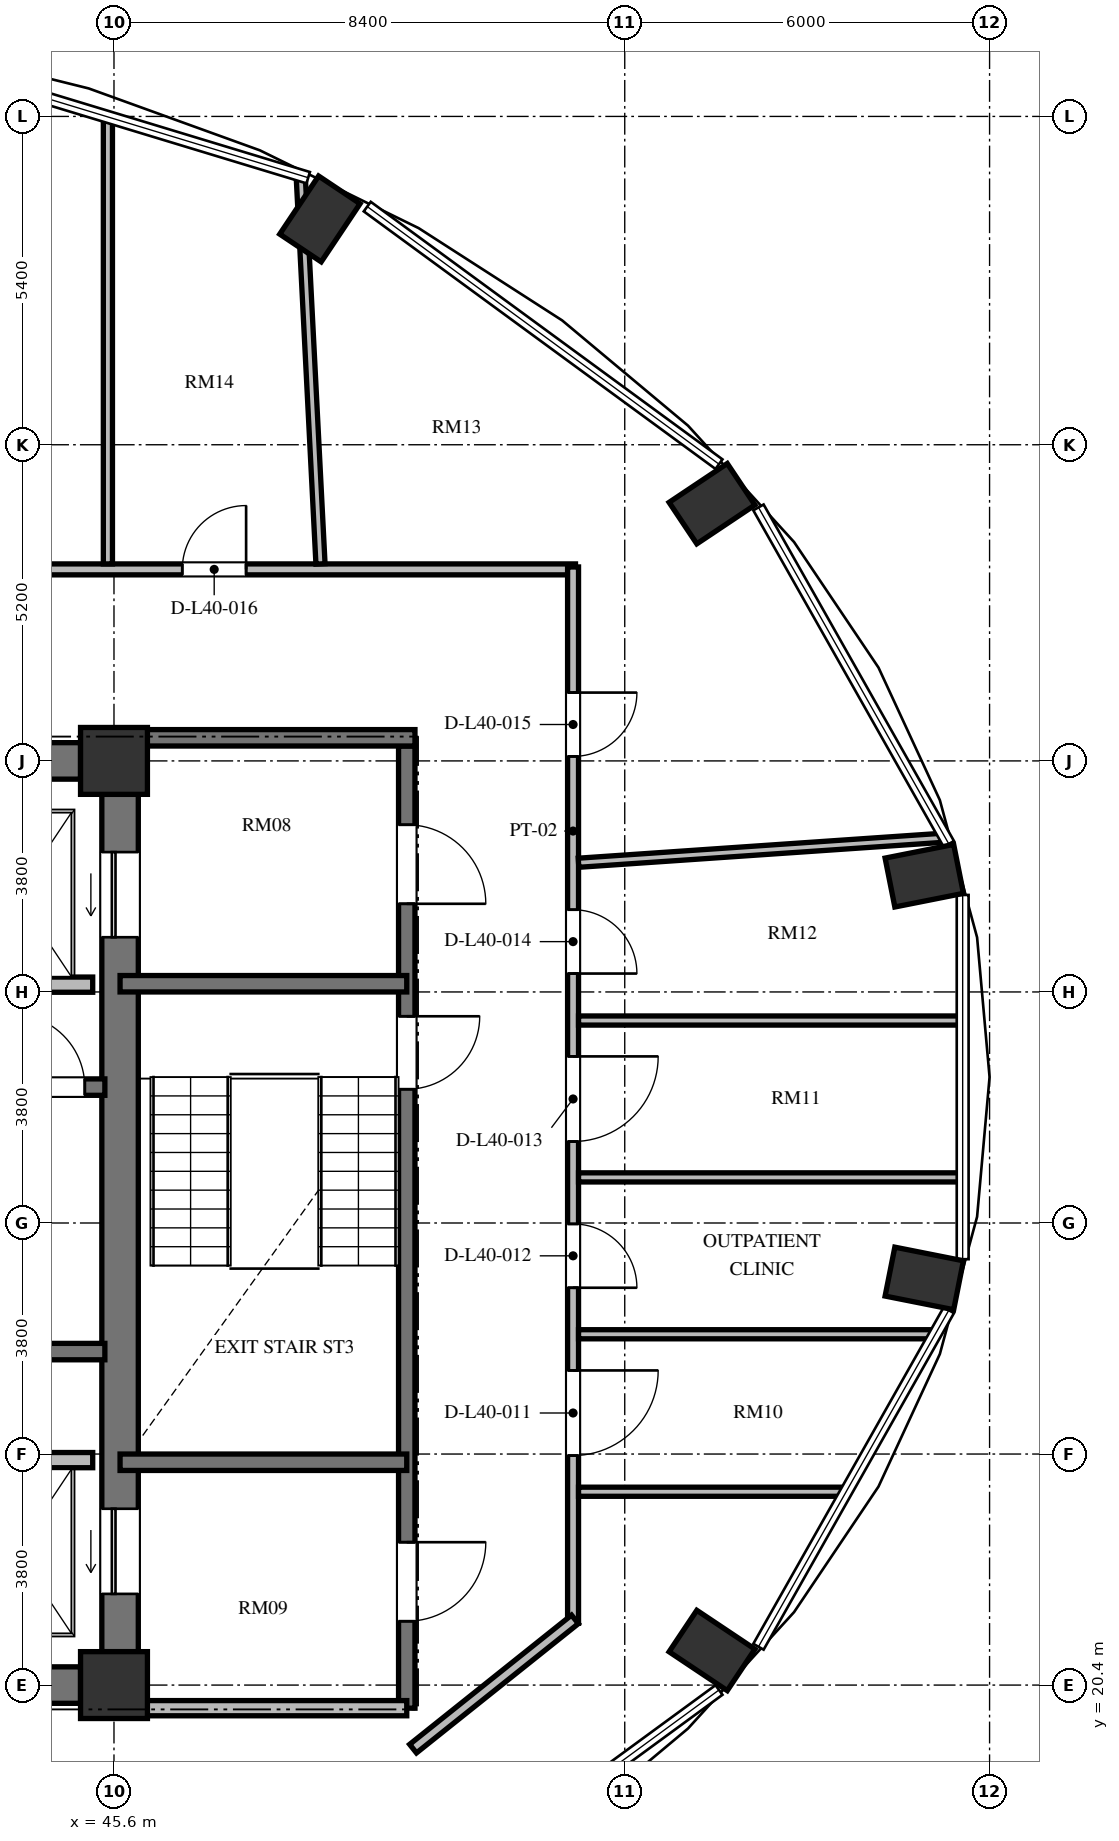
"""IFC4 building model, lengths in metres.
Left out: names, types, materials, properties, quantities, classifications, styles, units other than length and angle.
Written with IfcOpenShell. Run it as: python <this file> out.ifc"""

import sys

from ifc_helpers import new_model, si_unit, direction, frame, frame_2d, origin, origin_2d, place, context, subcontext, project, spatial, rectangle, extrude, element, fill, save


model = new_model("IFC4")
c1 = context("Model", 3, precision=1e-05, world=origin(), true_north=direction((0.0, 1.0)))
c2 = subcontext(c1, "Body", "Model", "MODEL_VIEW")
j1 = project(units=[si_unit("LENGTHUNIT", "METRE"), si_unit("PLANEANGLEUNIT", "RADIAN")], contexts=[c1])
p1 = place(None, origin())
s1 = spatial("IfcSite", under=j1, at=p1, CompositionType="ELEMENT")
p2 = place(p1, origin())
s2 = spatial("IfcBuilding", under=s1, at=p2, CompositionType="ELEMENT")
p3 = place(p2, frame((0.0, 0.0, 156.528)))
s3 = spatial("IfcBuildingStorey", under=s2, at=p3, CompositionType="ELEMENT", Elevation=156.528)
for number, where, z_axis, x_axis in (
    (1, (55.436, 20.969, 0.0), (0.0, 0.0, 1.0), (0.831, -0.556, 0.0)),
    (2, (58.926, 27.088, 0.0), (0.0, 0.0, 1.0), (0.981, -0.195, 0.0)),
    (3, (58.926, 33.712, 0.0), (0.0, 0.0, 1.0), (0.981, 0.195, 0.0)),
    (4, (55.436, 39.831, 0.0), (0.0, 0.0, 1.0), (0.831, 0.556, 0.0)),
    (5, (48.987, 44.514, 0.0), (0.0, 0.0, 1.0), (0.556, 0.831, 0.0)),
):
    element("IfcColumn", number, at=place(p3, frame(where, z_axis=z_axis, x_axis=x_axis)), inside=s3, PredefinedType="COLUMN", context=c2, shape_type="SweptSolid", body=[
        extrude(rectangle(XDim=1.15, YDim=0.82, at=origin_2d()), origin(), (0.0, 0.0, 1.0), 3.648),
    ])
for number, where, z_axis, x_axis in (
    (6, (45.6, 20.4, 0.0), (0.0, 0.0, 1.0), (1.0, 0.0, 0.0)),
    (7, (45.6, 35.6, 0.0), (0.0, 0.0, 1.0), (1.0, 0.0, 0.0)),
):
    element("IfcColumn", number, at=place(p3, frame(where, z_axis=z_axis, x_axis=x_axis)), inside=s3, PredefinedType="COLUMN", context=c2, shape_type="SweptSolid", body=[
        extrude(rectangle(XDim=1.1, YDim=1.1, at=origin_2d()), origin(), (0.0, 0.0, 1.0), 3.648),
    ])
p4 = place(p3, frame((45.7, 20.95, 0.0), z_axis=(0.0, 0.0, 1.0), x_axis=(0.0, 1.0, 0.0)))
e8 = element("IfcWall", 8, at=p4, inside=s3, PredefinedType="SHEAR", context=c2, shape_type="SweptSolid", body=[
    extrude(rectangle(XDim=14.1, YDim=0.6, at=frame_2d((7.05, 0.0))), origin(), (0.0, 0.0, 1.0), 3.648),
])
p5 = place(p4, frame((11.75, 0.0, 0.0)))
e9 = element("IfcOpeningElement", 9, at=p5, cuts=e8, PredefinedType="OPENING", context=c2, shape_type="SweptSolid", body=[
    extrude(rectangle(XDim=1.4, YDim=2.3, at=frame_2d((0.7, 1.15))), frame((0.0, 0.31, 0.0), z_axis=(0.0, -1.0, 0.0), x_axis=(1.0, 0.0, 0.0)), (0.0, 0.0, 1.0), 0.62),
])
p6 = place(p4, frame((0.95, 0.0, 0.0)))
e10 = element("IfcOpeningElement", 10, at=p6, cuts=e8, PredefinedType="OPENING", context=c2, shape_type="SweptSolid", body=[
    extrude(rectangle(XDim=1.4, YDim=2.3, at=frame_2d((0.7, 1.15))), frame((0.0, 0.31, 0.0), z_axis=(0.0, -1.0, 0.0), x_axis=(1.0, 0.0, 0.0)), (0.0, 0.0, 1.0), 0.62),
])
for number, where, z_axis, x_axis in (
    (11, (39.675, 20.4, 0.0), (0.0, 0.0, 1.0), (1.0, 0.0, 0.0)),
    (12, (39.675, 35.6, 0.0), (0.0, 0.0, 1.0), (1.0, 0.0, 0.0)),
):
    element("IfcWall", number, at=place(p3, frame(where, z_axis=z_axis, x_axis=x_axis)), inside=s3, PredefinedType="SHEAR", context=c2, shape_type="SweptSolid", body=[
        extrude(rectangle(XDim=5.375, YDim=0.6, at=frame_2d((2.688, 0.0))), origin(), (0.0, 0.0, 1.0), 3.648),
    ])
p7 = place(p3, frame((37.465, 30.235, 0.0), z_axis=(0.0, 0.0, 1.0), x_axis=(1.0, 0.0, 0.0)))
e13 = element("IfcWall", 13, at=p7, inside=s3, PredefinedType="SHEAR", context=c2, shape_type="SweptSolid", body=[
    extrude(rectangle(XDim=7.985, YDim=0.27, at=frame_2d((3.992, 0.0))), origin(), (0.0, 0.0, 1.0), 3.648),
])
p8 = place(p7, frame((6.455, 0.0, 0.0)))
e14 = element("IfcOpeningElement", 14, at=p8, cuts=e13, PredefinedType="OPENING", context=c2, shape_type="SweptSolid", body=[
    extrude(rectangle(XDim=1.2, YDim=2.15, at=frame_2d((0.6, 1.075))), frame((0.0, 0.145, 0.0), z_axis=(0.0, -1.0, 0.0), x_axis=(1.0, 0.0, 0.0)), (0.0, 0.0, 1.0), 0.29),
])
p9 = place(p3, frame((37.465, 25.885, 0.0), z_axis=(0.0, 0.0, 1.0), x_axis=(1.0, 0.0, 0.0)))
e15 = element("IfcWall", 15, at=p9, inside=s3, PredefinedType="SHEAR", context=c2, shape_type="SweptSolid", body=[
    extrude(rectangle(XDim=7.985, YDim=0.27, at=frame_2d((3.992, 0.0))), origin(), (0.0, 0.0, 1.0), 3.648),
])
for number, where, z_axis, x_axis in (
    (16, (42.95, 31.92, 0.0), (0.0, 0.0, 1.0), (1.0, 0.0, 0.0)),
    (17, (42.95, 24.1, 0.0), (0.0, 0.0, 1.0), (1.0, 0.0, 0.0)),
):
    element("IfcWall", number, at=place(p3, frame(where, z_axis=z_axis, x_axis=x_axis)), inside=s3, PredefinedType="SOLIDWALL", context=c2, shape_type="SweptSolid", body=[
        extrude(rectangle(XDim=2.3, YDim=0.25, at=frame_2d((1.15, 0.0))), origin(), (0.0, 0.0, 1.0), 3.428),
    ])
p10 = place(p3, frame((50.415, 35.845, 0.0), z_axis=(0.0, 0.0, 1.0), x_axis=(0.0, -1.0, 0.0)))
e18 = element("IfcWall", 18, at=p10, inside=s3, PredefinedType="SHEAR", context=c2, shape_type="SweptSolid", body=[
    extrude(rectangle(XDim=15.825, YDim=0.27, at=frame_2d((7.913, 0.0))), origin(), (0.0, 0.0, 1.0), 3.648),
])
p11 = place(p10, frame((4.445, 0.0, 0.0)))
e19 = element("IfcOpeningElement", 19, at=p11, cuts=e18, PredefinedType="OPENING", context=c2, shape_type="SweptSolid", body=[
    extrude(rectangle(XDim=1.2, YDim=2.15, at=frame_2d((0.6, 1.075))), frame((0.0, 0.145, 0.0), z_axis=(0.0, -1.0, 0.0), x_axis=(1.0, 0.0, 0.0)), (0.0, 0.0, 1.0), 0.29),
])
p12 = place(p10, frame((1.295, 0.0, 0.0)))
e20 = element("IfcOpeningElement", 20, at=p12, cuts=e18, PredefinedType="OPENING", context=c2, shape_type="SweptSolid", body=[
    extrude(rectangle(XDim=1.3, YDim=2.2, at=frame_2d((0.65, 1.1))), frame((0.0, 0.145, 0.0), z_axis=(0.0, -1.0, 0.0), x_axis=(1.0, 0.0, 0.0)), (0.0, 0.0, 1.0), 0.29),
])
p13 = place(p10, frame((13.095, 0.0, 0.0)))
e21 = element("IfcOpeningElement", 21, at=p13, cuts=e18, PredefinedType="OPENING", context=c2, shape_type="SweptSolid", body=[
    extrude(rectangle(XDim=1.3, YDim=2.2, at=frame_2d((0.65, 1.1))), frame((0.0, 0.145, 0.0), z_axis=(0.0, -1.0, 0.0), x_axis=(1.0, 0.0, 0.0)), (0.0, 0.0, 1.0), 0.29),
])
p14 = place(p3, frame((46.0, 35.98, 0.0), z_axis=(0.0, 0.0, 1.0), x_axis=(1.0, 0.0, 0.0)))
e22 = element("IfcWall", 22, at=p14, inside=s3, PredefinedType="SHEAR", context=c2, shape_type="SweptSolid", body=[
    extrude(rectangle(XDim=4.55, YDim=0.27, at=frame_2d((2.275, 0.0))), origin(), (0.0, 0.0, 1.0), 3.648),
])
for number, where, z_axis, x_axis in (
    (23, (45.7, 31.935, 0.0), (0.0, 0.0, 1.0), (1.0, 0.0, 0.0)),
    (24, (45.7, 24.065, 0.0), (0.0, 0.0, 1.0), (1.0, 0.0, 0.0)),
):
    element("IfcWall", number, at=place(p3, frame(where, z_axis=z_axis, x_axis=x_axis)), inside=s3, PredefinedType="SHEAR", context=c2, shape_type="SweptSolid", body=[
        extrude(rectangle(XDim=4.715, YDim=0.27, at=frame_2d((2.357, 0.0))), origin(), (0.0, 0.0, 1.0), 3.648),
    ])
p15 = place(p3, frame((45.7, 20.02, 0.0), z_axis=(0.0, 0.0, 1.0), x_axis=(1.0, 0.0, 0.0)))
e25 = element("IfcWall", 25, at=p15, inside=s3, PredefinedType="SOLIDWALL", context=c2, shape_type="SweptSolid", body=[
    extrude(rectangle(XDim=4.715, YDim=0.25, at=frame_2d((2.357, 0.0))), origin(), (0.0, 0.0, 1.0), 3.428),
])
p16 = place(p3, frame((39.46, 38.75, 0.0), z_axis=(0.0, 0.0, 1.0), x_axis=(1.0, 0.0, 0.0)))
e26 = element("IfcWall", 26, at=p16, inside=s3, PredefinedType="PARTITIONING", context=c2, shape_type="SweptSolid", body=[
    extrude(rectangle(XDim=13.73, YDim=0.18, at=frame_2d((6.865, 0.0))), origin(), (0.0, 0.0, 1.0), 3.428),
])
p17 = place(p16, frame((7.263, 0.0, 0.0)))
e27 = element("IfcOpeningElement", 27, at=p17, cuts=e26, PredefinedType="OPENING", context=c2, shape_type="SweptSolid", body=[
    extrude(rectangle(XDim=1.05, YDim=2.15, at=frame_2d((0.525, 1.075))), frame((0.0, 0.1, 0.0), z_axis=(0.0, -1.0, 0.0), x_axis=(1.0, 0.0, 0.0)), (0.0, 0.0, 1.0), 0.2),
])
p18 = place(p16, frame((3.765, 0.0, 0.0)))
e28 = element("IfcOpeningElement", 28, at=p18, cuts=e26, PredefinedType="OPENING", context=c2, shape_type="SweptSolid", body=[
    extrude(rectangle(XDim=1.05, YDim=2.15, at=frame_2d((0.525, 1.075))), frame((0.0, 0.1, 0.0), z_axis=(0.0, -1.0, 0.0), x_axis=(1.0, 0.0, 0.0)), (0.0, 0.0, 1.0), 0.2),
])
p19 = place(p3, frame((53.15, 38.79, 0.0), z_axis=(0.0, 0.0, 1.0), x_axis=(0.0, -1.0, 0.0)))
e29 = element("IfcWall", 29, at=p19, inside=s3, PredefinedType="PARTITIONING", context=c2, shape_type="SweptSolid", body=[
    extrude(rectangle(XDim=17.374, YDim=0.18, at=frame_2d((8.687, 0.0))), origin(), (0.0, 0.0, 1.0), 3.428),
])
p20 = place(p19, frame((13.215, 0.0, 0.0)))
e30 = element("IfcOpeningElement", 30, at=p20, cuts=e29, PredefinedType="OPENING", context=c2, shape_type="SweptSolid", body=[
    extrude(rectangle(XDim=1.4, YDim=2.2, at=frame_2d((0.7, 1.1))), frame((0.0, 0.1, 0.0), z_axis=(0.0, -1.0, 0.0), x_axis=(1.0, 0.0, 0.0)), (0.0, 0.0, 1.0), 0.2),
])
p21 = place(p19, frame((10.805, 0.0, 0.0)))
e31 = element("IfcOpeningElement", 31, at=p21, cuts=e29, PredefinedType="OPENING", context=c2, shape_type="SweptSolid", body=[
    extrude(rectangle(XDim=1.05, YDim=2.15, at=frame_2d((0.525, 1.075))), frame((0.0, 0.1, 0.0), z_axis=(0.0, -1.0, 0.0), x_axis=(1.0, 0.0, 0.0)), (0.0, 0.0, 1.0), 0.2),
])
p22 = place(p19, frame((8.05, 0.0, 0.0)))
e32 = element("IfcOpeningElement", 32, at=p22, cuts=e29, PredefinedType="OPENING", context=c2, shape_type="SweptSolid", body=[
    extrude(rectangle(XDim=1.4, YDim=2.2, at=frame_2d((0.7, 1.1))), frame((0.0, 0.1, 0.0), z_axis=(0.0, -1.0, 0.0), x_axis=(1.0, 0.0, 0.0)), (0.0, 0.0, 1.0), 0.2),
])
p23 = place(p19, frame((5.637, 0.0, 0.0)))
e33 = element("IfcOpeningElement", 33, at=p23, cuts=e29, PredefinedType="OPENING", context=c2, shape_type="SweptSolid", body=[
    extrude(rectangle(XDim=1.05, YDim=2.15, at=frame_2d((0.525, 1.075))), frame((0.0, 0.1, 0.0), z_axis=(0.0, -1.0, 0.0), x_axis=(1.0, 0.0, 0.0)), (0.0, 0.0, 1.0), 0.2),
])
p24 = place(p19, frame((2.066, 0.0, 0.0)))
e34 = element("IfcOpeningElement", 34, at=p24, cuts=e29, PredefinedType="OPENING", context=c2, shape_type="SweptSolid", body=[
    extrude(rectangle(XDim=1.05, YDim=2.15, at=frame_2d((0.525, 1.075))), frame((0.0, 0.1, 0.0), z_axis=(0.0, -1.0, 0.0), x_axis=(1.0, 0.0, 0.0)), (0.0, 0.0, 1.0), 0.2),
])
p25 = place(p3, frame((53.181, 21.481, 0.0), z_axis=(0.0, 0.0, 1.0), x_axis=(-0.781420737726, -0.624004511724, 0.0)))
e35 = element("IfcWall", 35, at=p25, inside=s3, PredefinedType="PARTITIONING", context=c2, shape_type="SweptSolid", body=[
    extrude(rectangle(XDim=3.407, YDim=0.18, at=frame_2d((1.704, 0.0))), origin(), (0.0, 0.0, 1.0), 3.428),
])
p26 = place(p3, frame((53.24, 23.58, 0.0), z_axis=(0.0, 0.0, 1.0), x_axis=(1.0, 0.0, 0.0)))
e36 = element("IfcWall", 36, at=p26, inside=s3, PredefinedType="PARTITIONING", context=c2, shape_type="SweptSolid", body=[
    extrude(rectangle(XDim=4.393, YDim=0.15, at=frame_2d((2.196, 0.0))), origin(), (0.0, 0.0, 1.0), 3.428),
])
p27 = place(p3, frame((53.24, 26.17, 0.0), z_axis=(0.0, 0.0, 1.0), x_axis=(1.0, 0.0, 0.0)))
e37 = element("IfcWall", 37, at=p27, inside=s3, PredefinedType="PARTITIONING", context=c2, shape_type="SweptSolid", body=[
    extrude(rectangle(XDim=5.857, YDim=0.15, at=frame_2d((2.929, 0.0))), origin(), (0.0, 0.0, 1.0), 3.428),
])
for number, where, z_axis, x_axis in (
    (38, (53.24, 28.75, 0.0), (0.0, 0.0, 1.0), (1.0, 0.0, 0.0)),
    (39, (53.24, 31.33, 0.0), (0.0, 0.0, 1.0), (1.0, 0.0, 0.0)),
):
    element("IfcWall", number, at=place(p3, frame(where, z_axis=z_axis, x_axis=x_axis)), inside=s3, PredefinedType="PARTITIONING", context=c2, shape_type="SweptSolid", body=[
        extrude(rectangle(XDim=6.307, YDim=0.15, at=frame_2d((3.154, 0.0))), origin(), (0.0, 0.0, 1.0), 3.428),
    ])
p28 = place(p3, frame((53.24, 33.925, 0.0), z_axis=(0.0, 0.0, 1.0), x_axis=(0.997659173086, 0.068382558873, 0.0)))
e40 = element("IfcWall", 40, at=p28, inside=s3, PredefinedType="PARTITIONING", context=c2, shape_type="SweptSolid", body=[
    extrude(rectangle(XDim=6.052, YDim=0.15, at=frame_2d((3.026, 0.0))), origin(), (0.0, 0.0, 1.0), 2.863),
])
p29 = place(p3, frame((45.5, 38.84, 0.0), z_axis=(0.0, 0.0, 1.0), x_axis=(0.0, 1.0, 0.0)))
e41 = element("IfcWall", 41, at=p29, inside=s3, PredefinedType="PARTITIONING", context=c2, shape_type="SweptSolid", body=[
    extrude(rectangle(XDim=7.336, YDim=0.15, at=frame_2d((3.668, 0.0))), origin(), (0.0, 0.0, 1.0), 3.428),
])
p30 = place(p3, frame((48.996, 38.84, 0.0), z_axis=(0.0, 0.0, 1.0), x_axis=(-0.050906361105, 0.998703430653, 0.0)))
e42 = element("IfcWall", 42, at=p30, inside=s3, PredefinedType="PARTITIONING", context=c2, shape_type="SweptSolid", body=[
    extrude(rectangle(XDim=6.398, YDim=0.15, at=frame_2d((3.199, 0.0))), origin(), (0.0, 0.0, 1.0), 3.428),
])
p31 = place(p8, origin())
e43 = element("IfcDoor", 43, at=p31, inside=s3, OperationType="SINGLE_SWING_LEFT", PredefinedType="DOOR", context=c2, shape_type="SweptSolid", body=[
    extrude(rectangle(XDim=1.2, YDim=2.15, at=frame_2d((0.6, 1.075))), frame((0.0, 0.025, 0.0), z_axis=(0.0, -1.0, 0.0), x_axis=(1.0, 0.0, 0.0)), (0.0, 0.0, 1.0), 0.05),
])
fill(e14, e43)
p32 = place(p5, origin())
e44 = element("IfcDoor", 44, at=p32, inside=s3, OperationType="SLIDING_TO_LEFT", PredefinedType="DOOR", context=c2, shape_type="SweptSolid", body=[
    extrude(rectangle(XDim=1.4, YDim=2.3, at=frame_2d((0.7, 1.15))), frame((0.0, 0.025, 0.0), z_axis=(0.0, -1.0, 0.0), x_axis=(1.0, 0.0, 0.0)), (0.0, 0.0, 1.0), 0.05),
])
fill(e9, e44)
p33 = place(p6, origin())
e45 = element("IfcDoor", 45, at=p33, inside=s3, OperationType="SLIDING_TO_LEFT", PredefinedType="DOOR", context=c2, shape_type="SweptSolid", body=[
    extrude(rectangle(XDim=1.4, YDim=2.3, at=frame_2d((0.7, 1.15))), frame((0.0, 0.025, 0.0), z_axis=(0.0, -1.0, 0.0), x_axis=(1.0, 0.0, 0.0)), (0.0, 0.0, 1.0), 0.05),
])
fill(e10, e45)
p34 = place(p11, origin())
e46 = element("IfcDoor", 46, at=p34, inside=s3, OperationType="SINGLE_SWING_LEFT", PredefinedType="DOOR", context=c2, shape_type="SweptSolid", body=[
    extrude(rectangle(XDim=1.2, YDim=2.15, at=frame_2d((0.6, 1.075))), frame((0.0, 0.025, 0.0), z_axis=(0.0, -1.0, 0.0), x_axis=(1.0, 0.0, 0.0)), (0.0, 0.0, 1.0), 0.05),
])
fill(e19, e46)
p35 = place(p12, origin())
e47 = element("IfcDoor", 47, at=p35, inside=s3, OperationType="SINGLE_SWING_RIGHT", PredefinedType="DOOR", context=c2, shape_type="SweptSolid", body=[
    extrude(rectangle(XDim=1.3, YDim=2.2, at=frame_2d((0.65, 1.1))), frame((0.0, 0.025, 0.0), z_axis=(0.0, -1.0, 0.0), x_axis=(1.0, 0.0, 0.0)), (0.0, 0.0, 1.0), 0.05),
])
fill(e20, e47)
p36 = place(p13, origin())
e48 = element("IfcDoor", 48, at=p36, inside=s3, OperationType="SINGLE_SWING_LEFT", PredefinedType="DOOR", context=c2, shape_type="SweptSolid", body=[
    extrude(rectangle(XDim=1.3, YDim=2.2, at=frame_2d((0.65, 1.1))), frame((0.0, 0.025, 0.0), z_axis=(0.0, -1.0, 0.0), x_axis=(1.0, 0.0, 0.0)), (0.0, 0.0, 1.0), 0.05),
])
fill(e21, e48)
p37 = place(p20, origin())
e49 = element("IfcDoor", 49, at=p37, inside=s3, OperationType="SINGLE_SWING_LEFT", PredefinedType="DOOR", context=c2, shape_type="SweptSolid", body=[
    extrude(rectangle(XDim=1.4, YDim=2.2, at=frame_2d((0.7, 1.1))), frame((0.0, 0.025, 0.0), z_axis=(0.0, -1.0, 0.0), x_axis=(1.0, 0.0, 0.0)), (0.0, 0.0, 1.0), 0.05),
])
fill(e30, e49)
p38 = place(p21, origin())
e50 = element("IfcDoor", 50, at=p38, inside=s3, OperationType="SINGLE_SWING_RIGHT", PredefinedType="DOOR", context=c2, shape_type="SweptSolid", body=[
    extrude(rectangle(XDim=1.05, YDim=2.15, at=frame_2d((0.525, 1.075))), frame((0.0, 0.025, 0.0), z_axis=(0.0, -1.0, 0.0), x_axis=(1.0, 0.0, 0.0)), (0.0, 0.0, 1.0), 0.05),
])
fill(e31, e50)
p39 = place(p22, origin())
e51 = element("IfcDoor", 51, at=p39, inside=s3, OperationType="SINGLE_SWING_LEFT", PredefinedType="DOOR", context=c2, shape_type="SweptSolid", body=[
    extrude(rectangle(XDim=1.4, YDim=2.2, at=frame_2d((0.7, 1.1))), frame((0.0, 0.025, 0.0), z_axis=(0.0, -1.0, 0.0), x_axis=(1.0, 0.0, 0.0)), (0.0, 0.0, 1.0), 0.05),
])
fill(e32, e51)
p40 = place(p23, origin())
e52 = element("IfcDoor", 52, at=p40, inside=s3, OperationType="SINGLE_SWING_RIGHT", PredefinedType="DOOR", context=c2, shape_type="SweptSolid", body=[
    extrude(rectangle(XDim=1.05, YDim=2.15, at=frame_2d((0.525, 1.075))), frame((0.0, 0.025, 0.0), z_axis=(0.0, -1.0, 0.0), x_axis=(1.0, 0.0, 0.0)), (0.0, 0.0, 1.0), 0.05),
])
fill(e33, e52)
p41 = place(p24, origin())
e53 = element("IfcDoor", 53, at=p41, inside=s3, OperationType="SINGLE_SWING_LEFT", PredefinedType="DOOR", context=c2, shape_type="SweptSolid", body=[
    extrude(rectangle(XDim=1.05, YDim=2.15, at=frame_2d((0.525, 1.075))), frame((0.0, 0.025, 0.0), z_axis=(0.0, -1.0, 0.0), x_axis=(1.0, 0.0, 0.0)), (0.0, 0.0, 1.0), 0.05),
])
fill(e34, e53)
p42 = place(p17, origin())
e54 = element("IfcDoor", 54, at=p42, inside=s3, OperationType="SINGLE_SWING_RIGHT", PredefinedType="DOOR", context=c2, shape_type="SweptSolid", body=[
    extrude(rectangle(XDim=1.05, YDim=2.15, at=frame_2d((0.525, 1.075))), frame((0.0, 0.025, 0.0), z_axis=(0.0, -1.0, 0.0), x_axis=(1.0, 0.0, 0.0)), (0.0, 0.0, 1.0), 0.05),
])
fill(e27, e54)
save(model, sys.argv[1])
